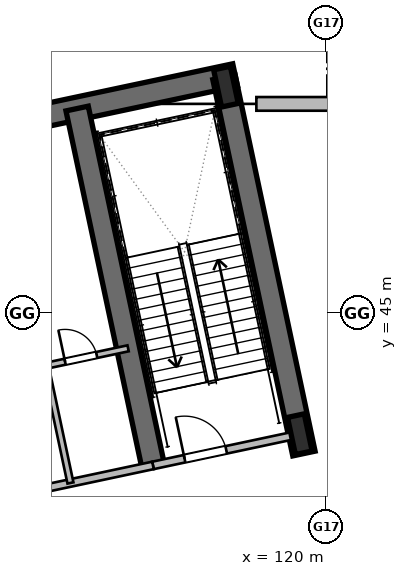
"""IFC4 building model, lengths in metres.
Left out: names, types, materials, properties, quantities, classifications, styles, units other than length and angle.
Written with IfcOpenShell. Run it as: python <this file> out.ifc"""

import sys

from ifc_helpers import new_model, si_unit, direction, frame, frame_2d, origin, origin_2d, place, context, subcontext, project, spatial, rectangle, i_section, extrude, element, fill, save


model = new_model("IFC4")
c1 = context("Model", 3, precision=1e-05, world=origin(), true_north=direction((0.0, 1.0)))
c2 = subcontext(c1, "Body", "Model", "MODEL_VIEW")
j1 = project(units=[si_unit("LENGTHUNIT", "METRE"), si_unit("PLANEANGLEUNIT", "RADIAN")], contexts=[c1])
p1 = place(None, origin())
s1 = spatial("IfcSite", under=j1, at=p1, CompositionType="ELEMENT")
p2 = place(p1, origin())
s2 = spatial("IfcBuilding", under=s1, at=p2, CompositionType="ELEMENT")
p3 = place(p2, frame((0.0, 0.0, 20.4)))
s3 = spatial("IfcBuildingStorey", under=s2, at=p3, CompositionType="ELEMENT", Elevation=20.4)
p4 = place(p3, frame((96.463, 46.77, 0.0), z_axis=(0.0, 0.0, 1.0), x_axis=(0.978147272959, 0.207913232873, 0.0)))
e1 = element("IfcWall", 1, at=p4, inside=s3, PredefinedType="SHEAR", context=c2, shape_type="SweptSolid", body=[
    extrude(rectangle(XDim=21.6, YDim=0.6, at=frame_2d((10.8, 0.0))), origin(), (0.0, 0.0, 1.0), 4.8),
])
p5 = place(p3, frame((119.402, 41.3, 0.0), z_axis=(0.0, 0.0, 1.0), x_axis=(-0.207904342798, 0.978149162575, 0.0)))
e2 = element("IfcWall", 2, at=p5, inside=s3, PredefinedType="SHEAR", context=c2, shape_type="SweptSolid", body=[
    extrude(rectangle(XDim=10.12, YDim=0.6, at=frame_2d((5.06, 0.0))), origin(), (0.0, 0.0, 1.0), 4.8),
])
p6 = place(p3, frame((115.43, 40.987, 0.0), z_axis=(0.0, 0.0, 1.0), x_axis=(-0.207903162969, 0.978149413345, 0.0)))
e3 = element("IfcWall", 3, at=p6, inside=s3, PredefinedType="SHEAR", context=c2, shape_type="SweptSolid", body=[
    extrude(rectangle(XDim=9.6, YDim=0.6, at=frame_2d((4.8, 0.0))), origin(), (0.0, 0.0, 1.0), 4.8),
])
for number, where, z_axis, x_axis in (
    (4, (119.293, 41.809, 0.0), (0.0, 0.0, 1.0), (0.978, 0.208, 0.0)),
    (5, (117.349, 50.954, 0.0), (0.0, 0.0, 1.0), (0.978, 0.208, 0.0)),
):
    element("IfcColumn", number, at=place(p3, frame(where, z_axis=z_axis, x_axis=x_axis)), inside=s3, PredefinedType="COLUMN", context=c2, shape_type="SweptSolid", body=[
        extrude(i_section(OverallWidth=0.45, OverallDepth=1.0, WebThickness=0.022, FlangeThickness=0.04, at=origin_2d()), origin(), (0.0, 0.0, 1.0), 4.8),
    ])
p7 = place(p3, frame((118.15, 50.5, 0.0), z_axis=(0.0, 0.0, 1.0), x_axis=(1.0, 0.0, 0.0)))
e6 = element("IfcWall", 6, at=p7, inside=s3, PredefinedType="SOLIDWALL", context=c2, shape_type="SweptSolid", body=[
    extrude(rectangle(XDim=24.53, YDim=0.36, at=frame_2d((12.265, 0.0))), origin(), (0.0, 0.0, 1.0), 4.43),
])
p8 = place(p3, frame((115.43, 40.987, 0.0), z_axis=(0.0, 0.0, 1.0), x_axis=(0.978146596989, 0.207916413008, 0.0)))
e7 = element("IfcWall", 7, at=p8, inside=s3, PredefinedType="PARTITIONING", context=c2, shape_type="SweptSolid", body=[
    extrude(rectangle(XDim=3.95, YDim=0.2, at=frame_2d((1.975, 0.0))), origin(), (0.0, 0.0, 1.0), 3.63),
])
p9 = place(p8, frame((0.85, 0.0, 0.0)))
e8 = element("IfcOpeningElement", 8, at=p9, cuts=e7, PredefinedType="OPENING", context=c2, shape_type="SweptSolid", body=[
    extrude(rectangle(XDim=1.12, YDim=2.1, at=frame_2d((0.56, 1.05))), frame((0.0, 0.11, 0.0), z_axis=(0.0, -1.0, 0.0), x_axis=(1.0, 0.0, 0.0)), (0.0, 0.0, 1.0), 0.22),
])
p10 = place(p3, frame((106.186, 39.022, 0.0), z_axis=(0.0, 0.0, 1.0), x_axis=(0.978145519981, 0.20792147975, 0.0)))
e9 = element("IfcWall", 9, at=p10, inside=s3, PredefinedType="PARTITIONING", context=c2, shape_type="SweptSolid", body=[
    extrude(rectangle(XDim=9.45, YDim=0.2, at=frame_2d((4.725, 0.0))), origin(), (0.0, 0.0, 1.0), 3.63),
])
p11 = place(p10, frame((0.55, 0.0, 0.0)))
e10 = element("IfcOpeningElement", 10, at=p11, cuts=e9, PredefinedType="OPENING", context=c2, shape_type="SweptSolid", body=[
    extrude(rectangle(XDim=1.05, YDim=2.1, at=frame_2d((0.525, 1.05))), frame((0.0, 0.11, 0.0), z_axis=(0.0, -1.0, 0.0), x_axis=(1.0, 0.0, 0.0)), (0.0, 0.0, 1.0), 0.22),
])
p12 = place(p3, frame((113.258, 40.526, 0.0), z_axis=(0.0, 0.0, 1.0), x_axis=(-0.207935688634, 0.978142499533, 0.0)))
e11 = element("IfcWall", 11, at=p12, inside=s3, PredefinedType="PARTITIONING", context=c2, shape_type="SweptSolid", body=[
    extrude(rectangle(XDim=3.15, YDim=0.16, at=frame_2d((1.575, 0.0))), origin(), (0.0, 0.0, 1.0), 4.43),
])
p13 = place(p3, frame((110.275, 43.112, 0.0), z_axis=(0.0, 0.0, 1.0), x_axis=(0.978152106073, 0.207890493732, 0.0)))
e12 = element("IfcWall", 12, at=p13, inside=s3, PredefinedType="PARTITIONING", context=c2, shape_type="SweptSolid", body=[
    extrude(rectangle(XDim=4.6, YDim=0.16, at=frame_2d((2.3, 0.0))), origin(), (0.0, 0.0, 1.0), 4.43),
])
p14 = place(p13, frame((0.785, 0.0, 0.0)))
e13 = element("IfcOpeningElement", 13, at=p14, cuts=e12, PredefinedType="OPENING", context=c2, shape_type="SweptSolid", body=[
    extrude(rectangle(XDim=0.85, YDim=2.05, at=frame_2d((0.425, 1.025))), frame((0.0, 0.09, 0.0), z_axis=(0.0, -1.0, 0.0), x_axis=(1.0, 0.0, 0.0)), (0.0, 0.0, 1.0), 0.18),
])
p15 = place(p13, frame((2.905, 0.0, 0.0)))
e14 = element("IfcOpeningElement", 14, at=p15, cuts=e12, PredefinedType="OPENING", context=c2, shape_type="SweptSolid", body=[
    extrude(rectangle(XDim=0.85, YDim=2.05, at=frame_2d((0.425, 1.025))), frame((0.0, 0.09, 0.0), z_axis=(0.0, -1.0, 0.0), x_axis=(1.0, 0.0, 0.0)), (0.0, 0.0, 1.0), 0.18),
])
p16 = place(p9, origin())
e15 = element("IfcDoor", 15, at=p16, inside=s3, OperationType="SINGLE_SWING_RIGHT", PredefinedType="DOOR", context=c2, shape_type="SweptSolid", body=[
    extrude(rectangle(XDim=1.12, YDim=2.1, at=frame_2d((0.56, 1.05))), frame((0.0, 0.025, 0.0), z_axis=(0.0, -1.0, 0.0), x_axis=(1.0, 0.0, 0.0)), (0.0, 0.0, 1.0), 0.05),
])
fill(e8, e15)
p17 = place(p15, origin())
e16 = element("IfcDoor", 16, at=p17, inside=s3, OperationType="SINGLE_SWING_LEFT", PredefinedType="DOOR", context=c2, shape_type="SweptSolid", body=[
    extrude(rectangle(XDim=0.85, YDim=2.05, at=frame_2d((0.425, 1.025))), frame((0.0, 0.025, 0.0), z_axis=(0.0, -1.0, 0.0), x_axis=(1.0, 0.0, 0.0)), (0.0, 0.0, 1.0), 0.05),
])
fill(e14, e16)
save(model, sys.argv[1])
